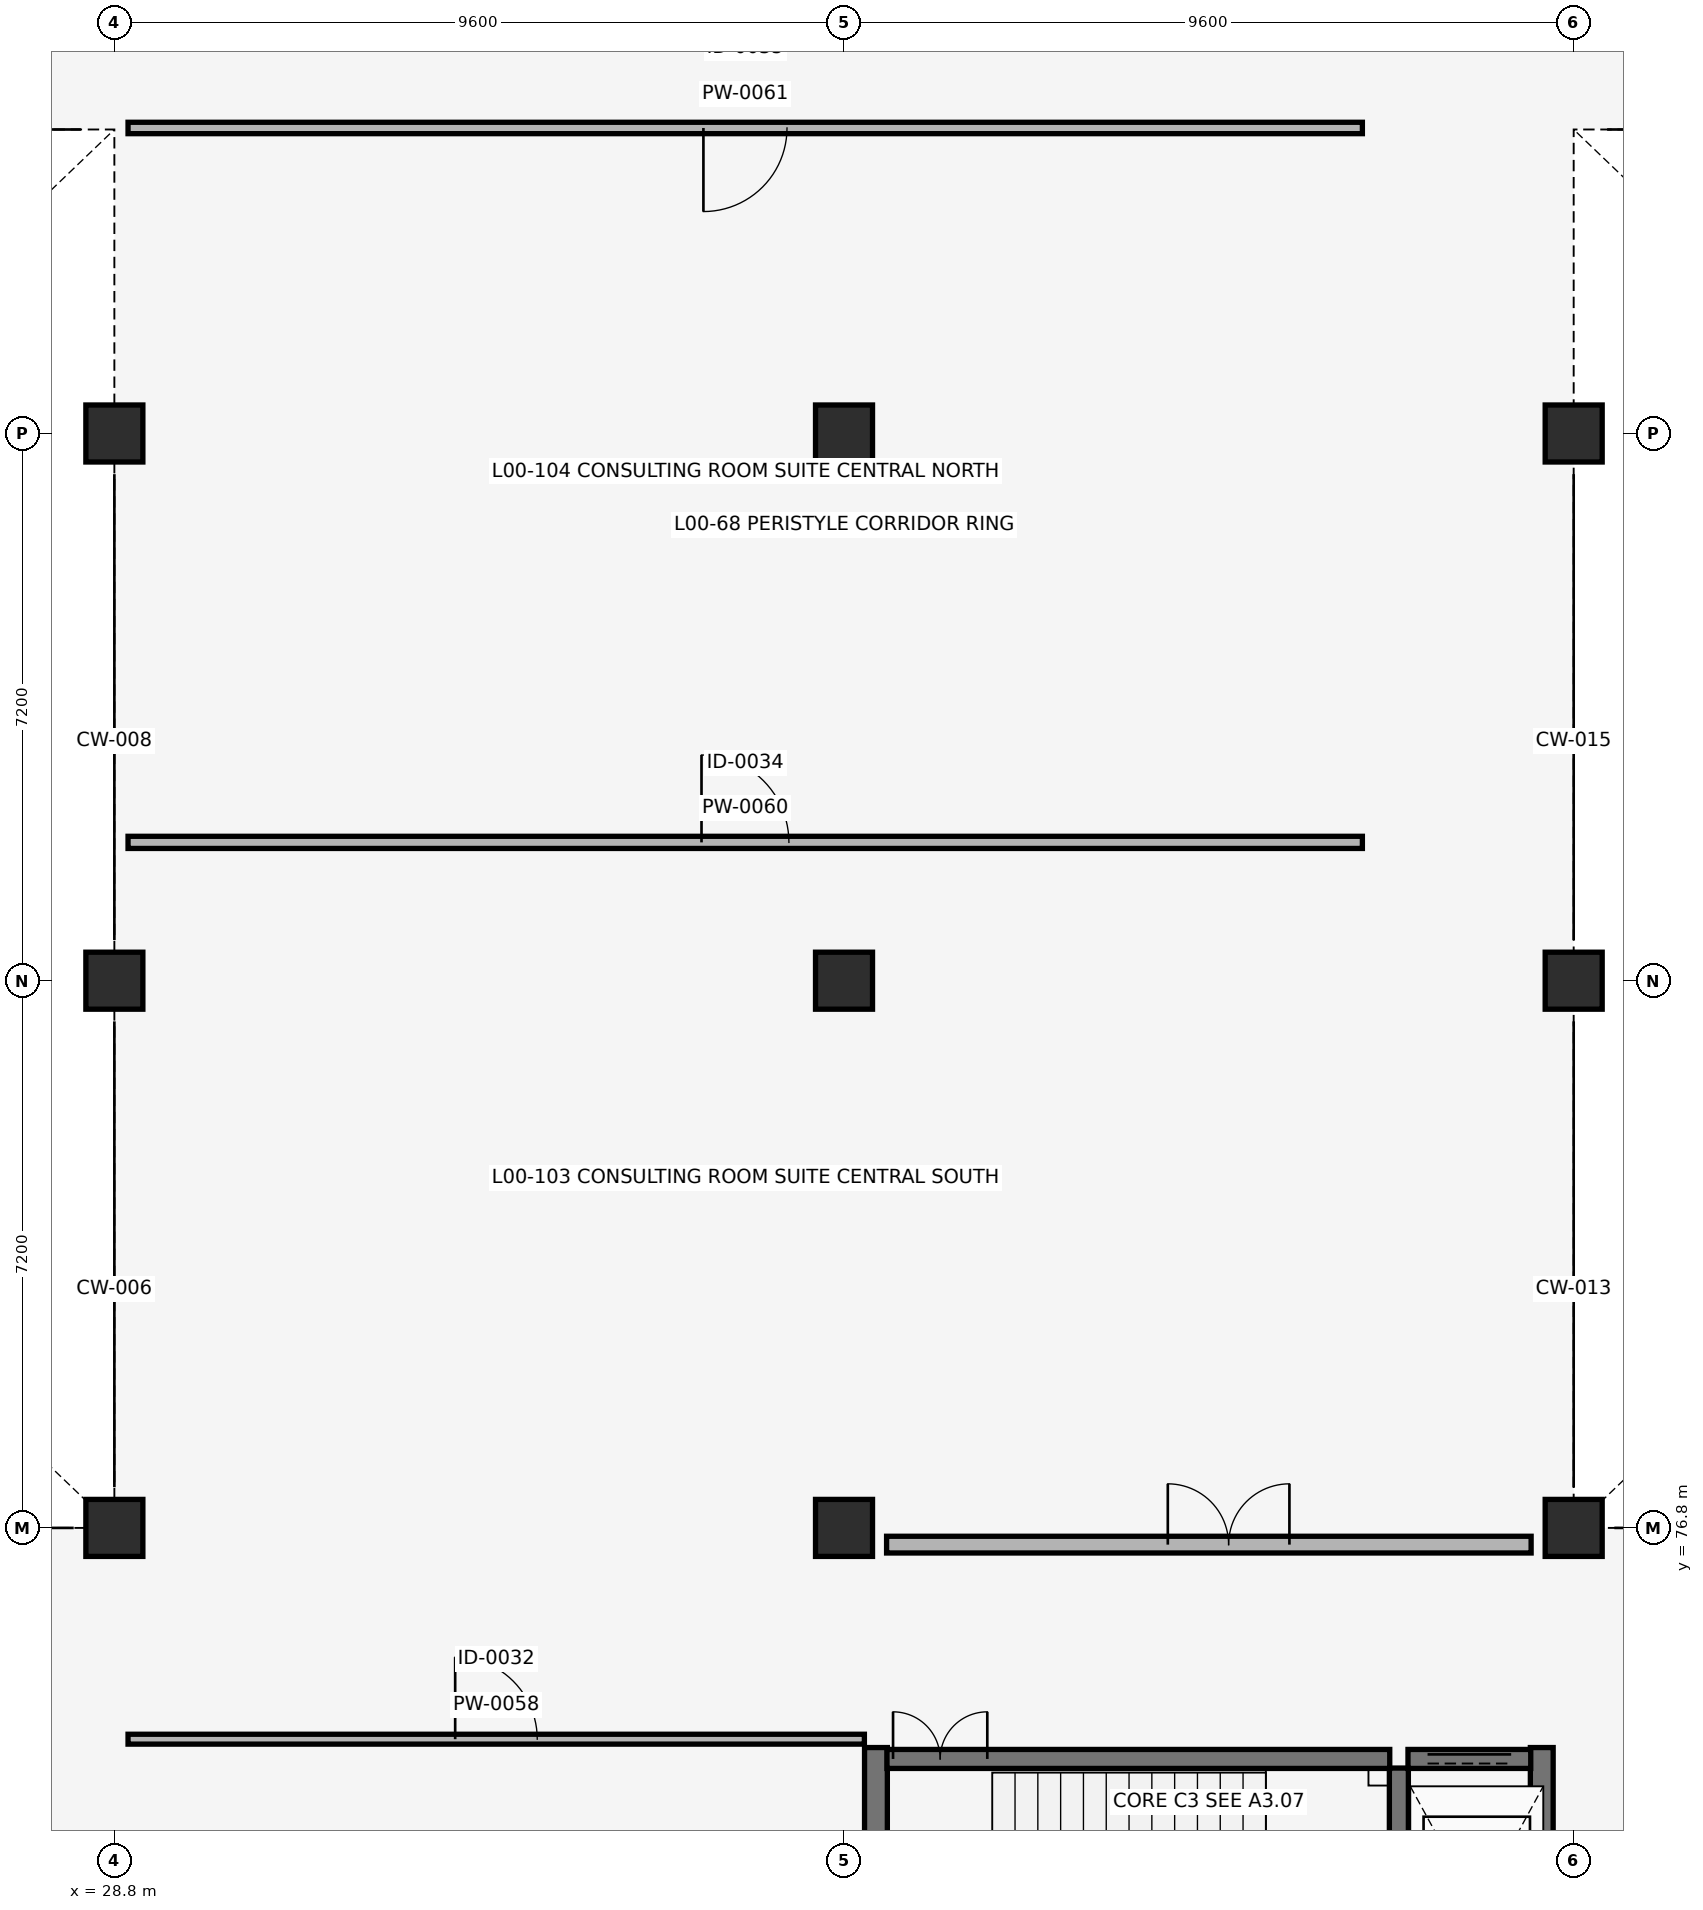
"""IFC4 building model, lengths in metres.
Left out: names, types, materials, properties, quantities, classifications, styles, units other than length and angle.
Written with IfcOpenShell. Run it as: python <this file> out.ifc"""

import sys

from ifc_helpers import new_model, si_unit, direction, frame, frame_2d, origin, origin_2d, place, context, subcontext, project, spatial, rectangle, circle, extrude, element, fill, save


model = new_model("IFC4")
c1 = context("Model", 3, precision=1e-05, world=origin(), true_north=direction((0.0, 1.0)))
c2 = subcontext(c1, "Body", "Model", "MODEL_VIEW")
j1 = project(units=[si_unit("LENGTHUNIT", "METRE"), si_unit("PLANEANGLEUNIT", "RADIAN")], contexts=[c1])
p1 = place(None, origin())
s1 = spatial("IfcSite", under=j1, at=p1, CompositionType="ELEMENT")
p2 = place(p1, origin())
s2 = spatial("IfcBuilding", under=s1, at=p2, CompositionType="ELEMENT")
p3 = place(p2, origin())
s3 = spatial("IfcBuildingStorey", under=s2, at=p3, CompositionType="ELEMENT", Elevation=0.0)
for number, where, z_axis, x_axis in (
    (1, (28.8, 76.8, -0.44), (0.0, 0.0, 1.0), (1.0, 0.0, 0.0)),
    (2, (28.8, 84.0, -0.44), (0.0, 0.0, 1.0), (1.0, 0.0, 0.0)),
    (3, (28.8, 91.2, -0.44), (0.0, 0.0, 1.0), (1.0, 0.0, 0.0)),
    (4, (38.4, 76.8, -0.44), (0.0, 0.0, 1.0), (1.0, 0.0, 0.0)),
    (5, (38.4, 84.0, -0.44), (0.0, 0.0, 1.0), (1.0, 0.0, 0.0)),
    (6, (38.4, 91.2, -0.44), (0.0, 0.0, 1.0), (1.0, 0.0, 0.0)),
    (7, (48.0, 76.8, -0.44), (0.0, 0.0, 1.0), (1.0, 0.0, 0.0)),
    (8, (48.0, 84.0, -0.44), (0.0, 0.0, 1.0), (1.0, 0.0, 0.0)),
    (9, (48.0, 91.2, -0.44), (0.0, 0.0, 1.0), (1.0, 0.0, 0.0)),
):
    element("IfcColumn", number, at=place(p3, frame(where, z_axis=z_axis, x_axis=x_axis)), inside=s3, PredefinedType="COLUMN", context=c2, shape_type="SweptSolid", body=[
        extrude(circle(Radius=0.375, at=origin_2d()), origin(), (0.0, 0.0, 1.0), 4.86),
    ])
for number, where, z_axis, x_axis in (
    (10, (38.82, 69.81, 0.0), (0.0, 0.0, 1.0), (0.0, 1.0, 0.0)),
    (11, (47.58, 69.81, 0.0), (0.0, 0.0, 1.0), (0.0, 1.0, 0.0)),
):
    element("IfcWall", number, at=place(p3, frame(where, z_axis=z_axis, x_axis=x_axis)), inside=s3, PredefinedType="SHEAR", context=c2, shape_type="SweptSolid", body=[
        extrude(rectangle(XDim=4.1, YDim=0.3, at=frame_2d((2.05, 0.0))), origin(), (0.0, 0.0, 1.0), 4.14),
    ])
p4 = place(p3, frame((45.7, 70.11, 0.0), z_axis=(0.0, 0.0, 1.0), x_axis=(0.0, 1.0, 0.0)))
e12 = element("IfcWall", 12, at=p4, inside=s3, PredefinedType="SHEAR", context=c2, shape_type="SweptSolid", body=[
    extrude(rectangle(XDim=3.53, YDim=0.25, at=frame_2d((1.765, 0.0))), origin(), (0.0, 0.0, 1.0), 4.14),
])
p5 = place(p3, frame((38.965, 73.76, 0.0), z_axis=(0.0, 0.0, 1.0), x_axis=(1.0, 0.0, 0.0)))
e13 = element("IfcWall", 13, at=p5, inside=s3, PredefinedType="SHEAR", context=c2, shape_type="SweptSolid", body=[
    extrude(rectangle(XDim=6.615, YDim=0.25, at=frame_2d((3.308, 0.0))), origin(), (0.0, 0.0, 1.0), 4.14),
])
p6 = place(p5, frame((0.08, 0.0, 0.0)))
e14 = element("IfcOpeningElement", 14, at=p6, cuts=e13, PredefinedType="OPENING", context=c2, shape_type="SweptSolid", body=[
    extrude(rectangle(XDim=1.24, YDim=2.15, at=frame_2d((0.62, 1.075))), frame((0.0, 0.135, 0.0), z_axis=(0.0, -1.0, 0.0), x_axis=(1.0, 0.0, 0.0)), (0.0, 0.0, 1.0), 0.27),
])
p7 = place(p3, frame((38.96, 76.58, 0.0), z_axis=(0.0, 0.0, 1.0), x_axis=(1.0, 0.0, 0.0)))
e15 = element("IfcWall", 15, at=p7, inside=s3, PredefinedType="PARTITIONING", context=c2, shape_type="SweptSolid", body=[
    extrude(rectangle(XDim=8.48, YDim=0.22, at=frame_2d((4.24, 0.0))), origin(), (0.0, 0.0, 1.0), 3.47),
])
p8 = place(p7, frame((3.7, 0.0, 0.0)))
e16 = element("IfcOpeningElement", 16, at=p8, cuts=e15, PredefinedType="OPENING", context=c2, shape_type="SweptSolid", body=[
    extrude(rectangle(XDim=1.6, YDim=2.2, at=frame_2d((0.8, 1.1))), frame((0.0, 0.12, 0.0), z_axis=(0.0, -1.0, 0.0), x_axis=(1.0, 0.0, 0.0)), (0.0, 0.0, 1.0), 0.24),
])
p9 = place(p3, frame((45.82, 73.76, 0.0), z_axis=(0.0, 0.0, 1.0), x_axis=(1.0, 0.0, 0.0)))
e17 = element("IfcWall", 17, at=p9, inside=s3, PredefinedType="SHEAR", context=c2, shape_type="SweptSolid", body=[
    extrude(rectangle(XDim=1.615, YDim=0.25, at=frame_2d((0.808, 0.0))), origin(), (0.0, 0.0, 1.0), 4.14),
])
p10 = place(p9, frame((0.258, 0.0, 0.0)))
e18 = element("IfcOpeningElement", 18, at=p10, cuts=e17, PredefinedType="OPENING", context=c2, shape_type="SweptSolid", body=[
    extrude(rectangle(XDim=1.1, YDim=2.15, at=frame_2d((0.55, 1.075))), frame((0.0, 0.135, 0.0), z_axis=(0.0, -1.0, 0.0), x_axis=(1.0, 0.0, 0.0)), (0.0, 0.0, 1.0), 0.27),
])
p11 = place(p3, frame((28.98, 74.02, 0.0), z_axis=(0.0, 0.0, 1.0), x_axis=(1.0, 0.0, 0.0)))
e19 = element("IfcWall", 19, at=p11, inside=s3, PredefinedType="PARTITIONING", context=c2, shape_type="SweptSolid", body=[
    extrude(rectangle(XDim=9.688, YDim=0.13, at=frame_2d((4.844, 0.0))), origin(), (0.0, 0.0, 1.0), 3.46),
])
p12 = place(p11, frame((4.304, 0.0, 0.0)))
e20 = element("IfcOpeningElement", 20, at=p12, cuts=e19, PredefinedType="OPENING", context=c2, shape_type="SweptSolid", body=[
    extrude(rectangle(XDim=1.08, YDim=2.1, at=frame_2d((0.54, 1.05))), frame((0.0, 0.075, 0.0), z_axis=(0.0, -1.0, 0.0), x_axis=(1.0, 0.0, 0.0)), (0.0, 0.0, 1.0), 0.15),
])
p13 = place(p3, frame((28.98, 85.82, 0.0), z_axis=(0.0, 0.0, 1.0), x_axis=(1.0, 0.0, 0.0)))
e21 = element("IfcWall", 21, at=p13, inside=s3, PredefinedType="PARTITIONING", context=c2, shape_type="SweptSolid", body=[
    extrude(rectangle(XDim=16.24, YDim=0.16, at=frame_2d((8.12, 0.0))), origin(), (0.0, 0.0, 1.0), 3.46),
])
p14 = place(p13, frame((7.545, 0.0, 0.0)))
e22 = element("IfcOpeningElement", 22, at=p14, cuts=e21, PredefinedType="OPENING", context=c2, shape_type="SweptSolid", body=[
    extrude(rectangle(XDim=1.15, YDim=2.1, at=frame_2d((0.575, 1.05))), frame((0.0, 0.09, 0.0), z_axis=(0.0, -1.0, 0.0), x_axis=(1.0, 0.0, 0.0)), (0.0, 0.0, 1.0), 0.18),
])
p15 = place(p3, frame((28.98, 95.22, 0.0), z_axis=(0.0, 0.0, 1.0), x_axis=(1.0, 0.0, 0.0)))
e23 = element("IfcWall", 23, at=p15, inside=s3, PredefinedType="PARTITIONING", context=c2, shape_type="SweptSolid", body=[
    extrude(rectangle(XDim=16.24, YDim=0.15, at=frame_2d((8.12, 0.0))), origin(), (0.0, 0.0, 1.0), 3.46),
])
p16 = place(p15, frame((7.57, 0.0, 0.0)))
e24 = element("IfcOpeningElement", 24, at=p16, cuts=e23, PredefinedType="OPENING", context=c2, shape_type="SweptSolid", body=[
    extrude(rectangle(XDim=1.1, YDim=2.1, at=frame_2d((0.55, 1.05))), frame((0.0, 0.085, 0.0), z_axis=(0.0, -1.0, 0.0), x_axis=(1.0, 0.0, 0.0)), (0.0, 0.0, 1.0), 0.17),
])
p17 = place(p6, origin())
e25 = element("IfcDoor", 25, at=p17, inside=s3, OperationType="DOUBLE_DOOR_SINGLE_SWING", PredefinedType="DOOR", context=c2, shape_type="SweptSolid", body=[
    extrude(rectangle(XDim=1.24, YDim=2.15, at=frame_2d((0.62, 1.075))), frame((0.0, 0.025, 0.0), z_axis=(0.0, -1.0, 0.0), x_axis=(1.0, 0.0, 0.0)), (0.0, 0.0, 1.0), 0.05),
])
fill(e14, e25)
p18 = place(p8, origin())
e26 = element("IfcDoor", 26, at=p18, inside=s3, OperationType="DOUBLE_DOOR_SINGLE_SWING", PredefinedType="DOOR", context=c2, shape_type="SweptSolid", body=[
    extrude(rectangle(XDim=1.6, YDim=2.2, at=frame_2d((0.8, 1.1))), frame((0.0, 0.025, 0.0), z_axis=(0.0, -1.0, 0.0), x_axis=(1.0, 0.0, 0.0)), (0.0, 0.0, 1.0), 0.05),
])
fill(e16, e26)
p19 = place(p10, origin())
e27 = element("IfcDoor", 27, at=p19, inside=s3, OperationType="DOUBLE_DOOR_SLIDING", PredefinedType="DOOR", context=c2, shape_type="SweptSolid", body=[
    extrude(rectangle(XDim=1.1, YDim=2.15, at=frame_2d((0.55, 1.075))), frame((0.0, 0.025, 0.0), z_axis=(0.0, -1.0, 0.0), x_axis=(1.0, 0.0, 0.0)), (0.0, 0.0, 1.0), 0.05),
])
fill(e18, e27)
p20 = place(p12, origin())
e28 = element("IfcDoor", 28, at=p20, inside=s3, OperationType="SINGLE_SWING_LEFT", PredefinedType="DOOR", context=c2, shape_type="SweptSolid", body=[
    extrude(rectangle(XDim=1.08, YDim=2.1, at=frame_2d((0.54, 1.05))), frame((0.0, 0.025, 0.0), z_axis=(0.0, -1.0, 0.0), x_axis=(1.0, 0.0, 0.0)), (0.0, 0.0, 1.0), 0.05),
])
fill(e20, e28)
p21 = place(p14, origin())
e29 = element("IfcDoor", 29, at=p21, inside=s3, OperationType="SINGLE_SWING_LEFT", PredefinedType="DOOR", context=c2, shape_type="SweptSolid", body=[
    extrude(rectangle(XDim=1.15, YDim=2.1, at=frame_2d((0.575, 1.05))), frame((0.0, 0.025, 0.0), z_axis=(0.0, -1.0, 0.0), x_axis=(1.0, 0.0, 0.0)), (0.0, 0.0, 1.0), 0.05),
])
fill(e22, e29)
p22 = place(p16, origin())
e30 = element("IfcDoor", 30, at=p22, inside=s3, OperationType="SINGLE_SWING_RIGHT", PredefinedType="DOOR", context=c2, shape_type="SweptSolid", body=[
    extrude(rectangle(XDim=1.1, YDim=2.1, at=frame_2d((0.55, 1.05))), frame((0.0, 0.025, 0.0), z_axis=(0.0, -1.0, 0.0), x_axis=(1.0, 0.0, 0.0)), (0.0, 0.0, 1.0), 0.05),
])
fill(e24, e30)
save(model, sys.argv[1])
